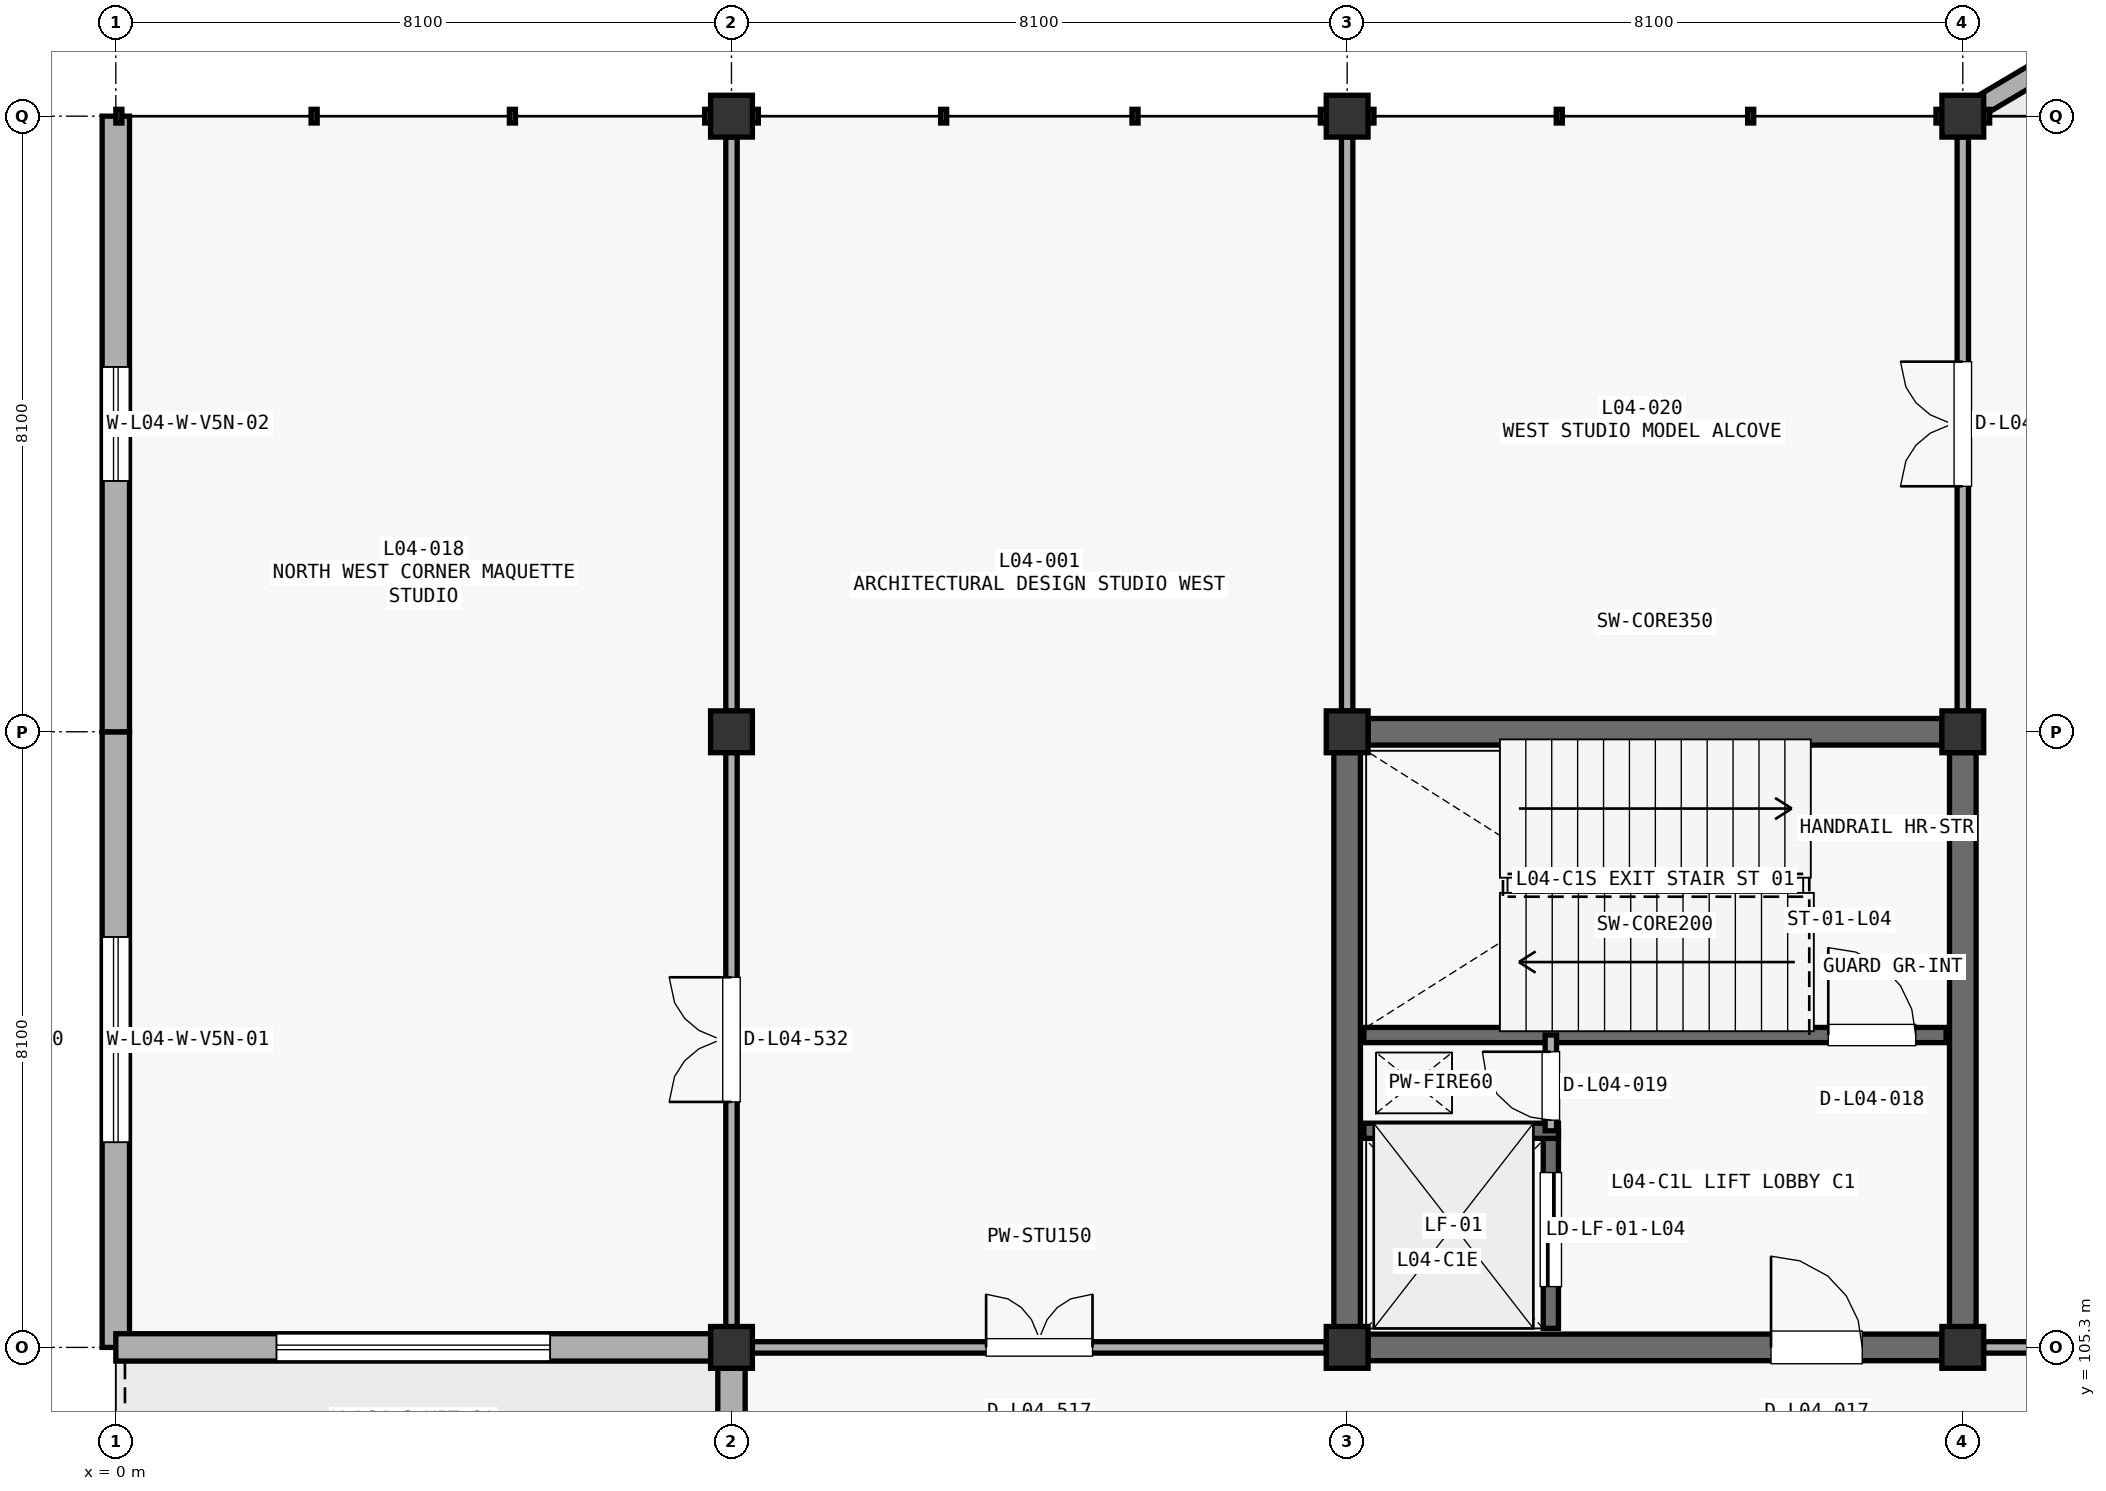
"""IFC4 building model, lengths in metres.
Left out: names, types, materials, properties, quantities, classifications, styles, units other than length and angle.
Written with IfcOpenShell. Run it as: python <this file> out.ifc"""

import sys

from ifc_helpers import new_model, si_unit, direction, frame, frame_2d, origin, origin_2d, place, context, subcontext, project, spatial, polyline, rectangle, outline, extrude, element, fill, save


model = new_model("IFC4")
c1 = context("Model", 3, precision=1e-05, world=origin(), true_north=direction((0.0, 1.0)))
c2 = subcontext(c1, "Body", "Model", "MODEL_VIEW")
j1 = project(units=[si_unit("LENGTHUNIT", "METRE"), si_unit("PLANEANGLEUNIT", "RADIAN")], contexts=[c1])
p1 = place(None, origin())
s1 = spatial("IfcSite", under=j1, at=p1, CompositionType="ELEMENT")
p2 = place(p1, origin())
s2 = spatial("IfcBuilding", under=s1, at=p2, CompositionType="ELEMENT")
p3 = place(p2, frame((0.0, 0.0, 18.53)))
s3 = spatial("IfcBuildingStorey", under=s2, at=p3, CompositionType="ELEMENT", Elevation=18.53)
for number, where, z_axis, x_axis in (
    (1, (8.1, 105.3, 0.0), (0.0, 0.0, 1.0), (1.0, 0.0, 0.0)),
    (2, (8.1, 113.4, 0.0), (0.0, 0.0, 1.0), (1.0, 0.0, 0.0)),
    (3, (8.1, 121.5, 0.0), (0.0, 0.0, 1.0), (1.0, 0.0, 0.0)),
    (4, (16.2, 105.3, 0.0), (0.0, 0.0, 1.0), (1.0, 0.0, 0.0)),
    (5, (16.2, 113.4, 0.0), (0.0, 0.0, 1.0), (1.0, 0.0, 0.0)),
    (6, (16.2, 121.5, 0.0), (0.0, 0.0, 1.0), (1.0, 0.0, 0.0)),
    (7, (24.3, 105.3, 0.0), (0.0, 0.0, 1.0), (1.0, 0.0, 0.0)),
    (8, (24.3, 113.4, 0.0), (0.0, 0.0, 1.0), (1.0, 0.0, 0.0)),
    (9, (24.3, 121.5, 0.0), (0.0, 0.0, 1.0), (1.0, 0.0, 0.0)),
):
    element("IfcColumn", number, at=place(p3, frame(where, z_axis=z_axis, x_axis=x_axis)), inside=s3, PredefinedType="COLUMN", context=c2, shape_type="SweptSolid", body=[
        extrude(rectangle(XDim=0.55, YDim=0.55, at=origin_2d()), origin(), (0.0, 0.0, 1.0), 4.42),
    ])
p4 = place(p3, frame((24.317, 121.51, -0.35), z_axis=(0.0, 0.0, 1.0), x_axis=(0.860297032473, 0.509793110897, 0.0)))
e10 = element("IfcWall", 10, at=p4, inside=s3, PredefinedType="STANDARD", context=c2, shape_type="SweptSolid", body=[
    extrude(outline(polyline([(0.0, 0.0), (9.375, 0.0), (9.375, 2.46), (0.0, 0.36), (0.0, 0.0)])), frame((0.0, 0.13, 0.0), z_axis=(0.0, -1.0, 0.0), x_axis=(1.0, 0.0, 0.0)), (0.0, 0.0, 1.0), 0.26),
])
p5 = place(p3, frame((0.0, 105.3, 0.0), z_axis=(0.0, 0.0, 1.0), x_axis=(0.0, 1.0, 0.0)))
e11 = element("IfcWall", 11, at=p5, inside=s3, PredefinedType="STANDARD", context=c2, shape_type="SweptSolid", body=[
    extrude(rectangle(XDim=8.1, YDim=0.36, at=frame_2d((4.05, 0.0))), origin(), (0.0, 0.0, 1.0), 4.162),
])
p6 = place(p5, frame((2.7, 0.0, 0.85)))
e12 = element("IfcOpeningElement", 12, at=p6, cuts=e11, PredefinedType="OPENING", context=c2, shape_type="SweptSolid", body=[
    extrude(rectangle(XDim=2.7, YDim=1.85, at=frame_2d((1.35, 0.925))), frame((0.0, 0.19, 0.0), z_axis=(0.0, -1.0, 0.0), x_axis=(1.0, 0.0, 0.0)), (0.0, 0.0, 1.0), 0.38),
])
p7 = place(p3, frame((0.0, 113.4, 0.0), z_axis=(0.0, 0.0, 1.0), x_axis=(0.0, 1.0, 0.0)))
e13 = element("IfcWall", 13, at=p7, inside=s3, PredefinedType="STANDARD", context=c2, shape_type="SweptSolid", body=[
    extrude(rectangle(XDim=8.1, YDim=0.36, at=frame_2d((4.05, 0.0))), origin(), (0.0, 0.0, 1.0), 4.162),
])
p8 = place(p7, frame((3.3, 0.0, 0.85)))
e14 = element("IfcOpeningElement", 14, at=p8, cuts=e13, PredefinedType="OPENING", context=c2, shape_type="SweptSolid", body=[
    extrude(rectangle(XDim=1.5, YDim=1.6, at=frame_2d((0.75, 0.8))), frame((0.0, 0.19, 0.0), z_axis=(0.0, -1.0, 0.0), x_axis=(1.0, 0.0, 0.0)), (0.0, 0.0, 1.0), 0.38),
])
p9 = place(p3, frame((8.1, 97.473, 0.0), z_axis=(0.0, 0.0, 1.0), x_axis=(0.0, 1.0, 0.0)))
e15 = element("IfcWall", 15, at=p9, inside=s3, PredefinedType="STANDARD", context=c2, shape_type="SweptSolid", body=[
    extrude(rectangle(XDim=7.554, YDim=0.36, at=frame_2d((3.777, 0.0))), origin(), (0.0, 0.0, 1.0), 3.212),
])
p10 = place(p9, frame((2.877, 0.0, 0.0)))
e16 = element("IfcOpeningElement", 16, at=p10, cuts=e15, PredefinedType="OPENING", context=c2, shape_type="SweptSolid", body=[
    extrude(rectangle(XDim=1.8, YDim=2.2, at=frame_2d((0.9, 1.1))), frame((0.0, 0.19, 0.0), z_axis=(0.0, -1.0, 0.0), x_axis=(1.0, 0.0, 0.0)), (0.0, 0.0, 1.0), 0.38),
])
p11 = place(p3, frame((0.0, 105.3, 0.0), z_axis=(0.0, 0.0, 1.0), x_axis=(1.0, 0.0, 0.0)))
e17 = element("IfcWall", 17, at=p11, inside=s3, PredefinedType="STANDARD", context=c2, shape_type="SweptSolid", body=[
    extrude(rectangle(XDim=7.827, YDim=0.36, at=frame_2d((3.914, 0.0))), origin(), (0.0, 0.0, 1.0), 4.162),
])
p12 = place(p11, frame((2.114, 0.0, 0.85)))
e18 = element("IfcOpeningElement", 18, at=p12, cuts=e17, PredefinedType="OPENING", context=c2, shape_type="SweptSolid", body=[
    extrude(rectangle(XDim=3.6, YDim=1.9, at=frame_2d((1.8, 0.95))), frame((0.0, 0.19, 0.0), z_axis=(0.0, -1.0, 0.0), x_axis=(1.0, 0.0, 0.0)), (0.0, 0.0, 1.0), 0.38),
])
p13 = place(p3, frame((16.473, 113.4, 0.0), z_axis=(0.0, 0.0, 1.0), x_axis=(1.0, 0.0, 0.0)))
e19 = element("IfcWall", 19, at=p13, inside=s3, PredefinedType="SHEAR", context=c2, shape_type="SweptSolid", body=[
    extrude(rectangle(XDim=7.554, YDim=0.35, at=frame_2d((3.777, 0.0))), origin(), (0.0, 0.0, 1.0), 4.162),
])
for number, where, z_axis, x_axis in (
    (20, (16.2, 105.573, 0.0), (0.0, 0.0, 1.0), (0.0, 1.0, 0.0)),
    (21, (24.3, 105.573, 0.0), (0.0, 0.0, 1.0), (0.0, 1.0, 0.0)),
):
    element("IfcWall", number, at=place(p3, frame(where, z_axis=z_axis, x_axis=x_axis)), inside=s3, PredefinedType="SHEAR", context=c2, shape_type="SweptSolid", body=[
        extrude(rectangle(XDim=7.554, YDim=0.35, at=frame_2d((3.777, 0.0))), origin(), (0.0, 0.0, 1.0), 4.162),
    ])
p14 = place(p3, frame((16.473, 105.3, 0.0), z_axis=(0.0, 0.0, 1.0), x_axis=(1.0, 0.0, 0.0)))
e22 = element("IfcWall", 22, at=p14, inside=s3, PredefinedType="SHEAR", context=c2, shape_type="SweptSolid", body=[
    extrude(rectangle(XDim=7.554, YDim=0.35, at=frame_2d((3.777, 0.0))), origin(), (0.0, 0.0, 1.0), 4.162),
])
p15 = place(p14, frame((5.304, 0.0, 0.0)))
e23 = element("IfcOpeningElement", 23, at=p15, cuts=e22, PredefinedType="OPENING", context=c2, shape_type="SweptSolid", body=[
    extrude(rectangle(XDim=1.2, YDim=2.2, at=frame_2d((0.6, 1.1))), frame((0.0, 0.185, 0.0), z_axis=(0.0, -1.0, 0.0), x_axis=(1.0, 0.0, 0.0)), (0.0, 0.0, 1.0), 0.37),
])
p16 = place(p3, frame((16.42, 109.41, 0.0), z_axis=(0.0, 0.0, 1.0), x_axis=(1.0, 0.0, 0.0)))
e24 = element("IfcWall", 24, at=p16, inside=s3, PredefinedType="SHEAR", context=c2, shape_type="SweptSolid", body=[
    extrude(rectangle(XDim=7.66, YDim=0.2, at=frame_2d((3.83, 0.0))), origin(), (0.0, 0.0, 1.0), 4.162),
])
p17 = place(p16, frame((6.11, 0.0, 0.0)))
e25 = element("IfcOpeningElement", 25, at=p17, cuts=e24, PredefinedType="OPENING", context=c2, shape_type="SweptSolid", body=[
    extrude(rectangle(XDim=1.15, YDim=2.2, at=frame_2d((0.575, 1.1))), frame((0.0, 0.11, 0.0), z_axis=(0.0, -1.0, 0.0), x_axis=(1.0, 0.0, 0.0)), (0.0, 0.0, 1.0), 0.22),
])
p18 = place(p3, frame((18.88, 105.55, 0.0), z_axis=(0.0, 0.0, 1.0), x_axis=(0.0, 1.0, 0.0)))
e26 = element("IfcWall", 26, at=p18, inside=s3, PredefinedType="SHEAR", context=c2, shape_type="SweptSolid", body=[
    extrude(rectangle(XDim=2.6, YDim=0.2, at=frame_2d((1.3, 0.0))), origin(), (0.0, 0.0, 1.0), 4.162),
])
p19 = place(p18, frame((0.55, 0.0, 0.0)))
e27 = element("IfcOpeningElement", 27, at=p19, cuts=e26, PredefinedType="OPENING", context=c2, shape_type="SweptSolid", body=[
    extrude(rectangle(XDim=1.5, YDim=2.3, at=frame_2d((0.75, 1.15))), frame((0.0, 0.11, 0.0), z_axis=(0.0, -1.0, 0.0), x_axis=(1.0, 0.0, 0.0)), (0.0, 0.0, 1.0), 0.22),
])
p20 = place(p3, frame((16.42, 108.15, 0.0), z_axis=(0.0, 0.0, 1.0), x_axis=(1.0, 0.0, 0.0)))
e28 = element("IfcWall", 28, at=p20, inside=s3, PredefinedType="SHEAR", context=c2, shape_type="SweptSolid", body=[
    extrude(rectangle(XDim=2.56, YDim=0.2, at=frame_2d((1.28, 0.0))), origin(), (0.0, 0.0, 1.0), 4.162),
])
p21 = place(p3, frame((18.88, 108.15, 0.0), z_axis=(0.0, 0.0, 1.0), x_axis=(0.0, 1.0, 0.0)))
e29 = element("IfcWall", 29, at=p21, inside=s3, PredefinedType="PARTITIONING", context=c2, shape_type="SweptSolid", body=[
    extrude(rectangle(XDim=1.26, YDim=0.15, at=frame_2d((0.63, 0.0))), origin(), (0.0, 0.0, 1.0), 4.162),
])
p22 = place(p21, frame((0.14, 0.0, 0.0)))
e30 = element("IfcOpeningElement", 30, at=p22, cuts=e29, PredefinedType="OPENING", context=c2, shape_type="SweptSolid", body=[
    extrude(rectangle(XDim=0.9, YDim=2.15, at=frame_2d((0.45, 1.075))), frame((0.0, 0.085, 0.0), z_axis=(0.0, -1.0, 0.0), x_axis=(1.0, 0.0, 0.0)), (0.0, 0.0, 1.0), 0.17),
])
p23 = place(p3, frame((8.373, 105.3, 0.0), z_axis=(0.0, 0.0, 1.0), x_axis=(1.0, 0.0, 0.0)))
e31 = element("IfcWall", 31, at=p23, inside=s3, PredefinedType="PARTITIONING", context=c2, shape_type="SweptSolid", body=[
    extrude(rectangle(XDim=7.554, YDim=0.15, at=frame_2d((3.777, 0.0))), origin(), (0.0, 0.0, 1.0), 3.212),
])
p24 = place(p23, frame((3.077, 0.0, 0.0)))
e32 = element("IfcOpeningElement", 32, at=p24, cuts=e31, PredefinedType="OPENING", context=c2, shape_type="SweptSolid", body=[
    extrude(rectangle(XDim=1.4, YDim=2.2, at=frame_2d((0.7, 1.1))), frame((0.0, 0.085, 0.0), z_axis=(0.0, -1.0, 0.0), x_axis=(1.0, 0.0, 0.0)), (0.0, 0.0, 1.0), 0.17),
])
p25 = place(p3, frame((16.2, 113.673, 0.0), z_axis=(0.0, 0.0, 1.0), x_axis=(0.0, 1.0, 0.0)))
e33 = element("IfcWall", 33, at=p25, inside=s3, PredefinedType="PARTITIONING", context=c2, shape_type="SweptSolid", body=[
    extrude(rectangle(XDim=7.554, YDim=0.15, at=frame_2d((3.777, 0.0))), origin(), (0.0, 0.0, 1.0), 3.312),
])
p26 = place(p3, frame((8.1, 105.573, 0.0), z_axis=(0.0, 0.0, 1.0), x_axis=(0.0, 1.0, 0.0)))
e34 = element("IfcWall", 34, at=p26, inside=s3, PredefinedType="PARTITIONING", context=c2, shape_type="SweptSolid", body=[
    extrude(rectangle(XDim=7.554, YDim=0.15, at=frame_2d((3.777, 0.0))), origin(), (0.0, 0.0, 1.0), 3.412),
])
p27 = place(p26, frame((2.957, 0.0, 0.0)))
e35 = element("IfcOpeningElement", 35, at=p27, cuts=e34, PredefinedType="OPENING", context=c2, shape_type="SweptSolid", body=[
    extrude(rectangle(XDim=1.64, YDim=2.25, at=frame_2d((0.82, 1.125))), frame((0.0, 0.085, 0.0), z_axis=(0.0, -1.0, 0.0), x_axis=(1.0, 0.0, 0.0)), (0.0, 0.0, 1.0), 0.17),
])
p28 = place(p3, frame((8.1, 113.673, 0.0), z_axis=(0.0, 0.0, 1.0), x_axis=(0.0, 1.0, 0.0)))
e36 = element("IfcWall", 36, at=p28, inside=s3, PredefinedType="PARTITIONING", context=c2, shape_type="SweptSolid", body=[
    extrude(rectangle(XDim=7.554, YDim=0.15, at=frame_2d((3.777, 0.0))), origin(), (0.0, 0.0, 1.0), 3.512),
])
p29 = place(p3, frame((24.573, 105.3, 0.0), z_axis=(0.0, 0.0, 1.0), x_axis=(1.0, 0.0, 0.0)))
e37 = element("IfcWall", 37, at=p29, inside=s3, PredefinedType="PARTITIONING", context=c2, shape_type="SweptSolid", body=[
    extrude(rectangle(XDim=7.554, YDim=0.15, at=frame_2d((3.777, 0.0))), origin(), (0.0, 0.0, 1.0), 3.512),
])
p30 = place(p29, frame((3.077, 0.0, 0.0)))
e38 = element("IfcOpeningElement", 38, at=p30, cuts=e37, PredefinedType="OPENING", context=c2, shape_type="SweptSolid", body=[
    extrude(rectangle(XDim=1.4, YDim=2.2, at=frame_2d((0.7, 1.1))), frame((0.0, 0.085, 0.0), z_axis=(0.0, -1.0, 0.0), x_axis=(1.0, 0.0, 0.0)), (0.0, 0.0, 1.0), 0.17),
])
p31 = place(p3, frame((24.3, 113.673, 0.0), z_axis=(0.0, 0.0, 1.0), x_axis=(0.0, 1.0, 0.0)))
e39 = element("IfcWall", 39, at=p31, inside=s3, PredefinedType="PARTITIONING", context=c2, shape_type="SweptSolid", body=[
    extrude(rectangle(XDim=7.554, YDim=0.15, at=frame_2d((3.777, 0.0))), origin(), (0.0, 0.0, 1.0), 3.412),
])
p32 = place(p31, frame((2.957, 0.0, 0.0)))
e40 = element("IfcOpeningElement", 40, at=p32, cuts=e39, PredefinedType="OPENING", context=c2, shape_type="SweptSolid", body=[
    extrude(rectangle(XDim=1.64, YDim=2.25, at=frame_2d((0.82, 1.125))), frame((0.0, 0.085, 0.0), z_axis=(0.0, -1.0, 0.0), x_axis=(1.0, 0.0, 0.0)), (0.0, 0.0, 1.0), 0.17),
])
p33 = place(p6, origin())
e41 = element("IfcWindow", 41, at=p33, inside=s3, PartitioningType="SINGLE_PANEL", PredefinedType="WINDOW", context=c2, shape_type="SweptSolid", body=[
    extrude(rectangle(XDim=2.7, YDim=1.85, at=frame_2d((1.35, 0.925))), frame((0.0, 0.03, 0.0), z_axis=(0.0, -1.0, 0.0), x_axis=(1.0, 0.0, 0.0)), (0.0, 0.0, 1.0), 0.06),
])
fill(e12, e41)
p34 = place(p8, origin())
e42 = element("IfcWindow", 42, at=p34, inside=s3, PartitioningType="SINGLE_PANEL", PredefinedType="WINDOW", context=c2, shape_type="SweptSolid", body=[
    extrude(rectangle(XDim=1.5, YDim=1.6, at=frame_2d((0.75, 0.8))), frame((0.0, 0.03, 0.0), z_axis=(0.0, -1.0, 0.0), x_axis=(1.0, 0.0, 0.0)), (0.0, 0.0, 1.0), 0.06),
])
fill(e14, e42)
p35 = place(p12, origin())
e43 = element("IfcWindow", 43, at=p35, inside=s3, PartitioningType="SINGLE_PANEL", PredefinedType="WINDOW", context=c2, shape_type="SweptSolid", body=[
    extrude(rectangle(XDim=3.6, YDim=1.9, at=frame_2d((1.8, 0.95))), frame((0.0, 0.03, 0.0), z_axis=(0.0, -1.0, 0.0), x_axis=(1.0, 0.0, 0.0)), (0.0, 0.0, 1.0), 0.06),
])
fill(e18, e43)
p36 = place(p15, origin())
e44 = element("IfcDoor", 44, at=p36, inside=s3, OperationType="SINGLE_SWING_LEFT", PredefinedType="DOOR", context=c2, shape_type="SweptSolid", body=[
    extrude(rectangle(XDim=1.2, YDim=2.2, at=frame_2d((0.6, 1.1))), frame((0.0, 0.025, 0.0), z_axis=(0.0, -1.0, 0.0), x_axis=(1.0, 0.0, 0.0)), (0.0, 0.0, 1.0), 0.05),
])
fill(e23, e44)
p37 = place(p17, origin())
e45 = element("IfcDoor", 45, at=p37, inside=s3, OperationType="SINGLE_SWING_LEFT", PredefinedType="DOOR", context=c2, shape_type="SweptSolid", body=[
    extrude(rectangle(XDim=1.15, YDim=2.2, at=frame_2d((0.575, 1.1))), frame((0.0, 0.025, 0.0), z_axis=(0.0, -1.0, 0.0), x_axis=(1.0, 0.0, 0.0)), (0.0, 0.0, 1.0), 0.05),
])
fill(e25, e45)
p38 = place(p19, origin())
e46 = element("IfcDoor", 46, at=p38, inside=s3, OperationType="SLIDING_TO_LEFT", PredefinedType="DOOR", context=c2, shape_type="SweptSolid", body=[
    extrude(rectangle(XDim=1.5, YDim=2.3, at=frame_2d((0.75, 1.15))), frame((0.0, 0.025, 0.0), z_axis=(0.0, -1.0, 0.0), x_axis=(1.0, 0.0, 0.0)), (0.0, 0.0, 1.0), 0.05),
])
fill(e27, e46)
p39 = place(p22, origin())
e47 = element("IfcDoor", 47, at=p39, inside=s3, OperationType="SINGLE_SWING_RIGHT", PredefinedType="DOOR", context=c2, shape_type="SweptSolid", body=[
    extrude(rectangle(XDim=0.9, YDim=2.15, at=frame_2d((0.45, 1.075))), frame((0.0, 0.025, 0.0), z_axis=(0.0, -1.0, 0.0), x_axis=(1.0, 0.0, 0.0)), (0.0, 0.0, 1.0), 0.05),
])
fill(e30, e47)
p40 = place(p24, origin())
e48 = element("IfcDoor", 48, at=p40, inside=s3, OperationType="DOUBLE_SWING_LEFT", PredefinedType="DOOR", context=c2, shape_type="SweptSolid", body=[
    extrude(rectangle(XDim=1.4, YDim=2.2, at=frame_2d((0.7, 1.1))), frame((0.0, 0.025, 0.0), z_axis=(0.0, -1.0, 0.0), x_axis=(1.0, 0.0, 0.0)), (0.0, 0.0, 1.0), 0.05),
])
fill(e32, e48)
p41 = place(p27, origin())
e49 = element("IfcDoor", 49, at=p41, inside=s3, OperationType="DOUBLE_SWING_LEFT", PredefinedType="DOOR", context=c2, shape_type="SweptSolid", body=[
    extrude(rectangle(XDim=1.64, YDim=2.25, at=frame_2d((0.82, 1.125))), frame((0.0, 0.025, 0.0), z_axis=(0.0, -1.0, 0.0), x_axis=(1.0, 0.0, 0.0)), (0.0, 0.0, 1.0), 0.05),
])
fill(e35, e49)
p42 = place(p32, origin())
e50 = element("IfcDoor", 50, at=p42, inside=s3, OperationType="DOUBLE_SWING_LEFT", PredefinedType="DOOR", context=c2, shape_type="SweptSolid", body=[
    extrude(rectangle(XDim=1.64, YDim=2.25, at=frame_2d((0.82, 1.125))), frame((0.0, 0.025, 0.0), z_axis=(0.0, -1.0, 0.0), x_axis=(1.0, 0.0, 0.0)), (0.0, 0.0, 1.0), 0.05),
])
fill(e40, e50)
save(model, sys.argv[1])
